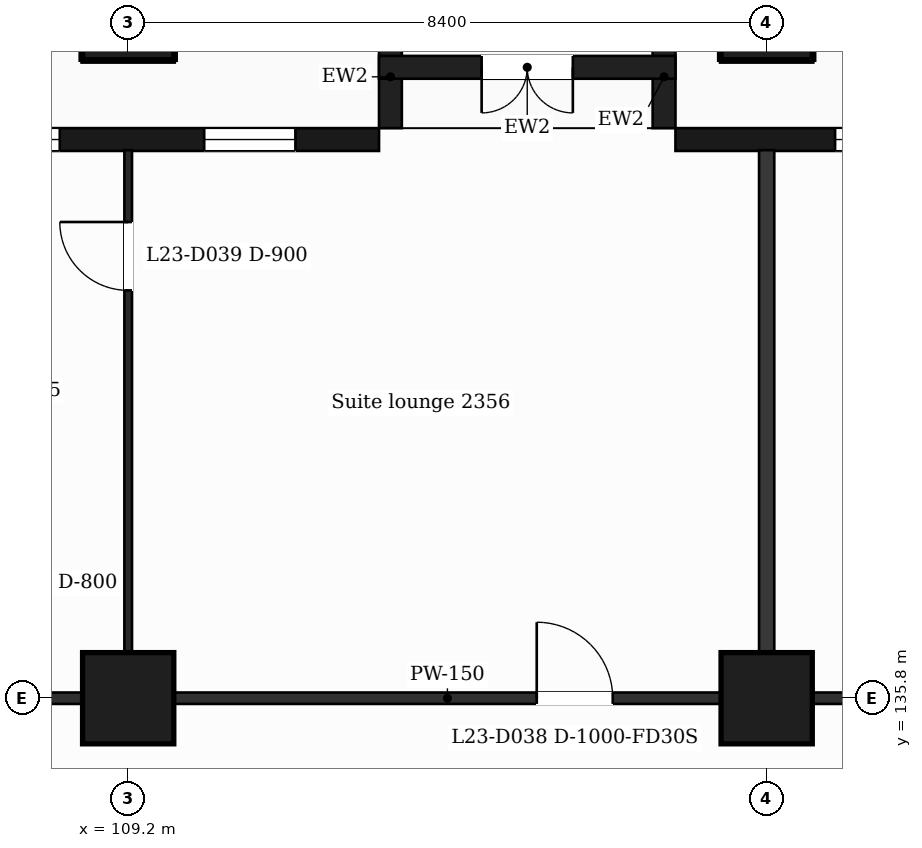
"""IFC4 building model, lengths in metres.
Left out: names, types, materials, properties, quantities, classifications, styles, units other than length and angle.
Written with IfcOpenShell. Run it as: python <this file> out.ifc"""

import sys

from ifc_helpers import new_model, si_unit, direction, frame, frame_2d, origin, origin_2d, place, context, subcontext, project, spatial, rectangle, extrude, element, fill, save


model = new_model("IFC4")
c1 = context("Model", 3, precision=1e-05, world=origin(), true_north=direction((0.0, 1.0)))
c2 = subcontext(c1, "Body", "Model", "MODEL_VIEW")
j1 = project(units=[si_unit("LENGTHUNIT", "METRE"), si_unit("PLANEANGLEUNIT", "RADIAN")], contexts=[c1])
p1 = place(None, origin())
s1 = spatial("IfcSite", under=j1, at=p1, CompositionType="ELEMENT")
p2 = place(p1, origin())
s2 = spatial("IfcBuilding", under=s1, at=p2, CompositionType="ELEMENT")
p3 = place(p2, frame((0.0, 0.0, 102.1)))
s3 = spatial("IfcBuildingStorey", under=s2, at=p3, CompositionType="ELEMENT", Elevation=102.1)
for number, where, z_axis, x_axis in (
    (1, (109.2, 135.8, 0.0), (0.0, 0.0, 1.0), (1.0, 0.0, 0.0)),
    (2, (117.6, 135.8, 0.0), (0.0, 0.0, 1.0), (1.0, 0.0, 0.0)),
    (3, (109.2, 144.8, 0.0), (0.0, 0.0, 1.0), (1.0, 0.0, 0.0)),
    (4, (117.6, 144.8, 0.0), (0.0, 0.0, 1.0), (1.0, 0.0, 0.0)),
):
    element("IfcColumn", number, at=place(p3, frame(where, z_axis=z_axis, x_axis=x_axis)), inside=s3, PredefinedType="COLUMN", context=c2, shape_type="SweptSolid", body=[
        extrude(rectangle(XDim=1.2, YDim=1.2, at=origin_2d()), origin(), (0.0, 0.0, 1.0), 3.7),
    ])
p4 = place(p3, frame((130.65, 143.15, 0.0), z_axis=(0.0, 0.0, 1.0), x_axis=(-1.0, 0.0, 0.0)))
e5 = element("IfcWall", 5, at=p4, inside=s3, PredefinedType="SOLIDWALL", context=c2, shape_type="SweptSolid", body=[
    extrude(rectangle(XDim=14.25, YDim=0.3, at=frame_2d((7.125, 0.0))), origin(), (0.0, 0.0, 1.0), 3.38),
])
p5 = place(p4, frame((1.35, 0.0, 0.9)))
e6 = element("IfcOpeningElement", 6, at=p5, cuts=e5, PredefinedType="OPENING", context=c2, shape_type="SweptSolid", body=[
    extrude(rectangle(XDim=2.4, YDim=2.1, at=frame_2d((1.2, 1.05))), frame((0.0, 0.16, 0.0), z_axis=(0.0, -1.0, 0.0), x_axis=(1.0, 0.0, 0.0)), (0.0, 0.0, 1.0), 0.32),
])
p6 = place(p4, frame((6.15, 0.0, 0.0)))
e7 = element("IfcOpeningElement", 7, at=p6, cuts=e5, PredefinedType="OPENING", context=c2, shape_type="SweptSolid", body=[
    extrude(rectangle(XDim=1.2, YDim=2.4, at=frame_2d((0.6, 1.2))), frame((0.0, 0.16, 0.0), z_axis=(0.0, -1.0, 0.0), x_axis=(1.0, 0.0, 0.0)), (0.0, 0.0, 1.0), 0.32),
])
p7 = place(p4, frame((9.75, 0.0, 0.9)))
e8 = element("IfcOpeningElement", 8, at=p7, cuts=e5, PredefinedType="OPENING", context=c2, shape_type="SweptSolid", body=[
    extrude(rectangle(XDim=2.4, YDim=2.1, at=frame_2d((1.2, 1.05))), frame((0.0, 0.16, 0.0), z_axis=(0.0, -1.0, 0.0), x_axis=(1.0, 0.0, 0.0)), (0.0, 0.0, 1.0), 0.32),
])
p8 = place(p3, frame((112.5, 143.15, 0.0), z_axis=(0.0, 0.0, 1.0), x_axis=(-1.0, 0.0, 0.0)))
e9 = element("IfcWall", 9, at=p8, inside=s3, PredefinedType="SOLIDWALL", context=c2, shape_type="SweptSolid", body=[
    extrude(rectangle(XDim=16.5, YDim=0.3, at=frame_2d((8.25, 0.0))), origin(), (0.0, 0.0, 1.0), 3.38),
])
p9 = place(p8, frame((1.1, 0.0, 0.9)))
e10 = element("IfcOpeningElement", 10, at=p9, cuts=e9, PredefinedType="OPENING", context=c2, shape_type="SweptSolid", body=[
    extrude(rectangle(XDim=1.2, YDim=2.1, at=frame_2d((0.6, 1.05))), frame((0.0, 0.16, 0.0), z_axis=(0.0, -1.0, 0.0), x_axis=(1.0, 0.0, 0.0)), (0.0, 0.0, 1.0), 0.32),
])
p10 = place(p8, frame((4.2, 0.0, 0.9)))
e11 = element("IfcOpeningElement", 11, at=p10, cuts=e9, PredefinedType="OPENING", context=c2, shape_type="SweptSolid", body=[
    extrude(rectangle(XDim=2.4, YDim=2.1, at=frame_2d((1.2, 1.05))), frame((0.0, 0.16, 0.0), z_axis=(0.0, -1.0, 0.0), x_axis=(1.0, 0.0, 0.0)), (0.0, 0.0, 1.0), 0.32),
])
p11 = place(p8, frame((9.0, 0.0, 0.0)))
e12 = element("IfcOpeningElement", 12, at=p11, cuts=e9, PredefinedType="OPENING", context=c2, shape_type="SweptSolid", body=[
    extrude(rectangle(XDim=1.2, YDim=2.4, at=frame_2d((0.6, 1.2))), frame((0.0, 0.16, 0.0), z_axis=(0.0, -1.0, 0.0), x_axis=(1.0, 0.0, 0.0)), (0.0, 0.0, 1.0), 0.32),
])
p12 = place(p8, frame((12.3, 0.0, 0.9)))
e13 = element("IfcOpeningElement", 13, at=p12, cuts=e9, PredefinedType="OPENING", context=c2, shape_type="SweptSolid", body=[
    extrude(rectangle(XDim=1.2, YDim=2.1, at=frame_2d((0.6, 1.05))), frame((0.0, 0.16, 0.0), z_axis=(0.0, -1.0, 0.0), x_axis=(1.0, 0.0, 0.0)), (0.0, 0.0, 1.0), 0.32),
])
p13 = place(p8, frame((14.1, 0.0, 0.9)))
e14 = element("IfcOpeningElement", 14, at=p13, cuts=e9, PredefinedType="OPENING", context=c2, shape_type="SweptSolid", body=[
    extrude(rectangle(XDim=1.2, YDim=2.1, at=frame_2d((0.6, 1.05))), frame((0.0, 0.16, 0.0), z_axis=(0.0, -1.0, 0.0), x_axis=(1.0, 0.0, 0.0)), (0.0, 0.0, 1.0), 0.32),
])
for number, where, z_axis, x_axis in (
    (15, (116.25, 143.3, 0.0), (0.0, 0.0, 1.0), (0.0, 1.0, 0.0)),
    (16, (112.65, 143.3, 0.0), (0.0, 0.0, 1.0), (0.0, 1.0, 0.0)),
):
    element("IfcWall", number, at=place(p3, frame(where, z_axis=z_axis, x_axis=x_axis)), inside=s3, PredefinedType="SOLIDWALL", context=c2, shape_type="SweptSolid", body=[
        extrude(rectangle(XDim=1.35, YDim=0.3, at=frame_2d((0.675, 0.0))), origin(), (0.0, 0.0, 1.0), 3.38),
    ])
p14 = place(p3, frame((116.4, 144.1, 0.0), z_axis=(0.0, 0.0, 1.0), x_axis=(-1.0, 0.0, 0.0)))
e17 = element("IfcWall", 17, at=p14, inside=s3, PredefinedType="SOLIDWALL", context=c2, shape_type="SweptSolid", body=[
    extrude(rectangle(XDim=3.9, YDim=0.3, at=frame_2d((1.95, 0.0))), origin(), (0.0, 0.0, 1.0), 3.38),
])
p15 = place(p14, frame((1.35, 0.0, 0.0)))
e18 = element("IfcOpeningElement", 18, at=p15, cuts=e17, PredefinedType="OPENING", context=c2, shape_type="SweptSolid", body=[
    extrude(rectangle(XDim=1.2, YDim=2.4, at=frame_2d((0.6, 1.2))), frame((0.0, 0.16, 0.0), z_axis=(0.0, -1.0, 0.0), x_axis=(1.0, 0.0, 0.0)), (0.0, 0.0, 1.0), 0.32),
])
p16 = place(p3, frame((90.895, 135.8, 0.0), z_axis=(0.0, 0.0, 1.0), x_axis=(1.0, 0.0, 0.0)))
e19 = element("IfcWall", 19, at=p16, inside=s3, PredefinedType="PARTITIONING", context=c2, shape_type="SweptSolid", body=[
    extrude(rectangle(XDim=45.011, YDim=0.15, at=frame_2d((22.505, 0.0))), origin(), (0.0, 0.0, 1.0), 3.38),
])
p17 = place(p16, frame((7.455, 0.0, 0.0)))
e20 = element("IfcOpeningElement", 20, at=p17, cuts=e19, PredefinedType="OPENING", context=c2, shape_type="SweptSolid", body=[
    extrude(rectangle(XDim=1.0, YDim=2.1, at=frame_2d((0.5, 1.05))), frame((0.0, 0.085, 0.0), z_axis=(0.0, -1.0, 0.0), x_axis=(1.0, 0.0, 0.0)), (0.0, 0.0, 1.0), 0.17),
])
p18 = place(p16, frame((10.892, 0.0, 0.0)))
e21 = element("IfcOpeningElement", 21, at=p18, cuts=e19, PredefinedType="OPENING", context=c2, shape_type="SweptSolid", body=[
    extrude(rectangle(XDim=0.95, YDim=2.1, at=frame_2d((0.475, 1.05))), frame((0.0, 0.085, 0.0), z_axis=(0.0, -1.0, 0.0), x_axis=(1.0, 0.0, 0.0)), (0.0, 0.0, 1.0), 0.17),
])
p19 = place(p16, frame((23.68, 0.0, 0.0)))
e22 = element("IfcOpeningElement", 22, at=p19, cuts=e19, PredefinedType="OPENING", context=c2, shape_type="SweptSolid", body=[
    extrude(rectangle(XDim=1.0, YDim=2.1, at=frame_2d((0.5, 1.05))), frame((0.0, 0.085, 0.0), z_axis=(0.0, -1.0, 0.0), x_axis=(1.0, 0.0, 0.0)), (0.0, 0.0, 1.0), 0.17),
])
p20 = place(p16, frame((30.318, 0.0, 0.0)))
e23 = element("IfcOpeningElement", 23, at=p20, cuts=e19, PredefinedType="OPENING", context=c2, shape_type="SweptSolid", body=[
    extrude(rectangle(XDim=0.95, YDim=2.1, at=frame_2d((0.475, 1.05))), frame((0.0, 0.085, 0.0), z_axis=(0.0, -1.0, 0.0), x_axis=(1.0, 0.0, 0.0)), (0.0, 0.0, 1.0), 0.17),
])
p21 = place(p16, frame((36.005, 0.0, 0.0)))
e24 = element("IfcOpeningElement", 24, at=p21, cuts=e19, PredefinedType="OPENING", context=c2, shape_type="SweptSolid", body=[
    extrude(rectangle(XDim=1.0, YDim=2.1, at=frame_2d((0.5, 1.05))), frame((0.0, 0.085, 0.0), z_axis=(0.0, -1.0, 0.0), x_axis=(1.0, 0.0, 0.0)), (0.0, 0.0, 1.0), 0.17),
])
p22 = place(p3, frame((109.2, 135.875, 0.0), z_axis=(0.0, 0.0, 1.0), x_axis=(0.0, 1.0, 0.0)))
e25 = element("IfcWall", 25, at=p22, inside=s3, PredefinedType="PARTITIONING", context=c2, shape_type="SweptSolid", body=[
    extrude(rectangle(XDim=7.135, YDim=0.1, at=frame_2d((3.567, 0.0))), origin(), (0.0, 0.0, 1.0), 3.38),
])
p23 = place(p22, frame((5.29, 0.0, 0.0)))
e26 = element("IfcOpeningElement", 26, at=p23, cuts=e25, PredefinedType="OPENING", context=c2, shape_type="SweptSolid", body=[
    extrude(rectangle(XDim=0.9, YDim=2.1, at=frame_2d((0.45, 1.05))), frame((0.0, 0.06, 0.0), z_axis=(0.0, -1.0, 0.0), x_axis=(1.0, 0.0, 0.0)), (0.0, 0.0, 1.0), 0.12),
])
p24 = place(p3, frame((117.6, 135.875, 0.0), z_axis=(0.0, 0.0, 1.0), x_axis=(0.0, 1.0, 0.0)))
e27 = element("IfcWall", 27, at=p24, inside=s3, PredefinedType="PARTITIONING", context=c2, shape_type="SweptSolid", body=[
    extrude(rectangle(XDim=7.135, YDim=0.2, at=frame_2d((3.567, 0.0))), origin(), (0.0, 0.0, 1.0), 3.38),
])
p25 = place(p7, origin())
e28 = element("IfcWindow", 28, at=p25, inside=s3, PartitioningType="SINGLE_PANEL", PredefinedType="WINDOW", context=c2, shape_type="SweptSolid", body=[
    extrude(rectangle(XDim=2.4, YDim=2.1, at=frame_2d((1.2, 1.05))), frame((0.0, 0.03, 0.0), z_axis=(0.0, -1.0, 0.0), x_axis=(1.0, 0.0, 0.0)), (0.0, 0.0, 1.0), 0.06),
])
fill(e8, e28)
p26 = place(p9, origin())
e29 = element("IfcWindow", 29, at=p26, inside=s3, PartitioningType="SINGLE_PANEL", PredefinedType="WINDOW", context=c2, shape_type="SweptSolid", body=[
    extrude(rectangle(XDim=1.2, YDim=2.1, at=frame_2d((0.6, 1.05))), frame((0.0, 0.03, 0.0), z_axis=(0.0, -1.0, 0.0), x_axis=(1.0, 0.0, 0.0)), (0.0, 0.0, 1.0), 0.06),
])
fill(e10, e29)
p27 = place(p10, origin())
e30 = element("IfcWindow", 30, at=p27, inside=s3, PartitioningType="SINGLE_PANEL", PredefinedType="WINDOW", context=c2, shape_type="SweptSolid", body=[
    extrude(rectangle(XDim=2.4, YDim=2.1, at=frame_2d((1.2, 1.05))), frame((0.0, 0.03, 0.0), z_axis=(0.0, -1.0, 0.0), x_axis=(1.0, 0.0, 0.0)), (0.0, 0.0, 1.0), 0.06),
])
fill(e11, e30)
p28 = place(p15, origin())
e31 = element("IfcDoor", 31, at=p28, inside=s3, OperationType="DOUBLE_DOOR_SINGLE_SWING", PredefinedType="DOOR", context=c2, shape_type="SweptSolid", body=[
    extrude(rectangle(XDim=1.2, YDim=2.4, at=frame_2d((0.6, 1.2))), frame((0.0, 0.025, 0.0), z_axis=(0.0, -1.0, 0.0), x_axis=(1.0, 0.0, 0.0)), (0.0, 0.0, 1.0), 0.05),
])
fill(e18, e31)
p29 = place(p19, origin())
e32 = element("IfcDoor", 32, at=p29, inside=s3, OperationType="SINGLE_SWING_LEFT", PredefinedType="DOOR", context=c2, shape_type="SweptSolid", body=[
    extrude(rectangle(XDim=1.0, YDim=2.1, at=frame_2d((0.5, 1.05))), frame((0.0, 0.025, 0.0), z_axis=(0.0, -1.0, 0.0), x_axis=(1.0, 0.0, 0.0)), (0.0, 0.0, 1.0), 0.05),
])
fill(e22, e32)
p30 = place(p23, origin())
e33 = element("IfcDoor", 33, at=p30, inside=s3, OperationType="SINGLE_SWING_RIGHT", PredefinedType="DOOR", context=c2, shape_type="SweptSolid", body=[
    extrude(rectangle(XDim=0.9, YDim=2.1, at=frame_2d((0.45, 1.05))), frame((0.0, 0.025, 0.0), z_axis=(0.0, -1.0, 0.0), x_axis=(1.0, 0.0, 0.0)), (0.0, 0.0, 1.0), 0.05),
])
fill(e26, e33)
save(model, sys.argv[1])
